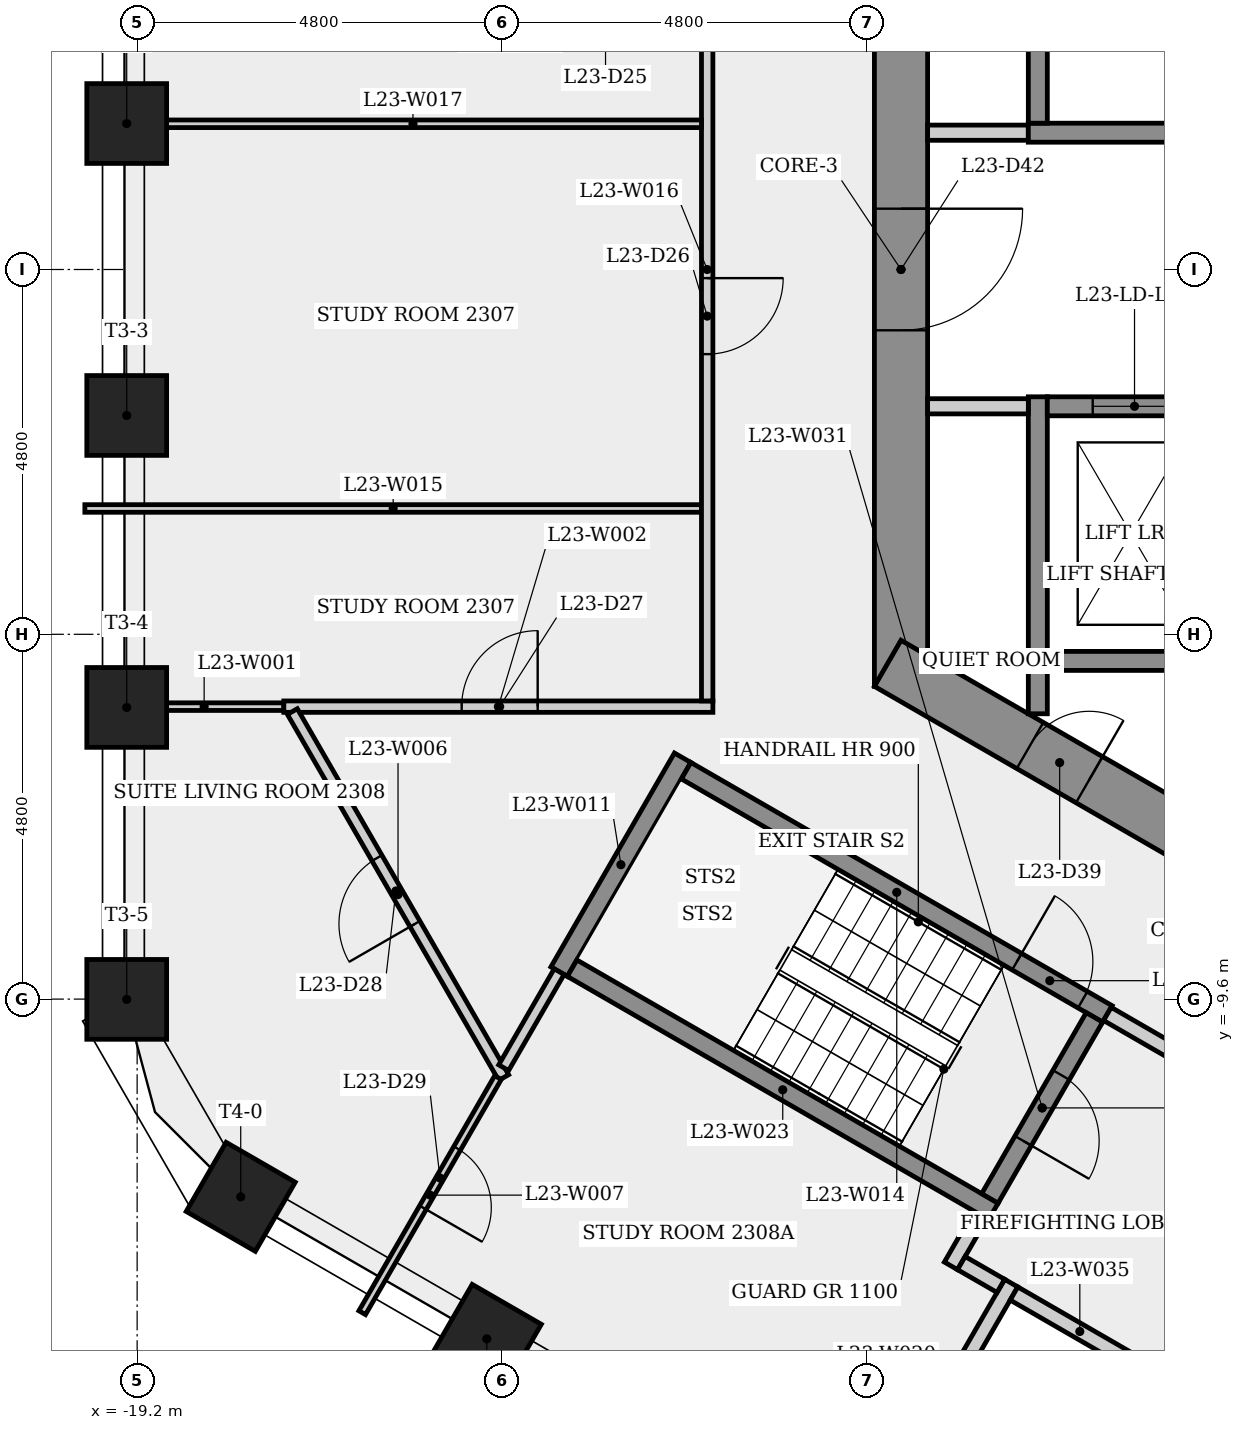
"""IFC4 building model, lengths in metres.
Left out: names, types, materials, properties, quantities, classifications, styles, units other than length and angle.
Written with IfcOpenShell. Run it as: python <this file> out.ifc"""

import sys

from ifc_helpers import new_model, si_unit, direction, frame, frame_2d, origin, origin_2d, place, context, subcontext, project, spatial, rectangle, extrude, element, fill, save


model = new_model("IFC4")
c1 = context("Model", 3, precision=1e-05, world=origin(), true_north=direction((0.0, 1.0)))
c2 = subcontext(c1, "Body", "Model", "MODEL_VIEW")
j1 = project(units=[si_unit("LENGTHUNIT", "METRE"), si_unit("PLANEANGLEUNIT", "RADIAN")], contexts=[c1])
p1 = place(None, origin())
s1 = spatial("IfcSite", under=j1, at=p1, CompositionType="ELEMENT")
p2 = place(p1, origin())
s2 = spatial("IfcBuilding", under=s1, at=p2, CompositionType="ELEMENT")
p3 = place(p2, frame((0.0, 0.0, 89.9)))
s3 = spatial("IfcBuildingStorey", under=s2, at=p3, CompositionType="ELEMENT", Elevation=89.9)
p4 = place(p3, frame((-9.15, 5.485, 0.0), z_axis=(0.0, 0.0, 1.0), x_axis=(0.0, -1.0, 0.0)))
e1 = element("IfcWall", 1, at=p4, inside=s3, PredefinedType="SHEAR", context=c2, shape_type="SweptSolid", body=[
    extrude(rectangle(XDim=10.97, YDim=0.7, at=frame_2d((5.485, 0.0))), origin(), (0.0, 0.0, 1.0), 3.4),
])
p5 = place(p4, frame((4.685, 0.0, 0.0)))
e2 = element("IfcOpeningElement", 2, at=p5, cuts=e1, PredefinedType="OPENING", context=c2, shape_type="SweptSolid", body=[
    extrude(rectangle(XDim=1.6, YDim=2.1, at=frame_2d((0.8, 1.05))), frame((0.0, 0.36, 0.0), z_axis=(0.0, -1.0, 0.0), x_axis=(1.0, 0.0, 0.0)), (0.0, 0.0, 1.0), 0.72),
])
p6 = place(p3, frame((-9.325, -5.182, 0.0), z_axis=(0.0, 0.0, 1.0), x_axis=(0.866023993627, -0.500002442456, 0.0)))
e3 = element("IfcWall", 3, at=p6, inside=s3, PredefinedType="SHEAR", context=c2, shape_type="SweptSolid", body=[
    extrude(rectangle(XDim=10.97, YDim=0.7, at=frame_2d((5.485, 0.0))), origin(), (0.0, 0.0, 1.0), 3.4),
])
p7 = place(p6, frame((2.163, 0.0, 0.0)))
e4 = element("IfcOpeningElement", 4, at=p7, cuts=e3, PredefinedType="OPENING", context=c2, shape_type="SweptSolid", body=[
    extrude(rectangle(XDim=0.9, YDim=2.1, at=frame_2d((0.45, 1.05))), frame((0.0, 0.36, 0.0), z_axis=(0.0, -1.0, 0.0), x_axis=(1.0, 0.0, 0.0)), (0.0, 0.0, 1.0), 0.72),
])
for number, where, z_axis, x_axis in (
    (5, (-19.337, 1.921, 0.0), (0.0, 0.0, 1.0), (-1.0, 0.0, 0.0)),
    (6, (-19.337, -1.921, 0.0), (0.0, 0.0, 1.0), (-1.0, 0.0, 0.0)),
    (7, (-19.337, -5.762, 0.0), (0.0, 0.0, 1.0), (-1.0, 0.0, 0.0)),
    (8, (-19.337, -9.604, 0.0), (0.0, 0.0, 1.0), (-1.0, 0.0, 0.0)),
    (9, (-17.837, -12.202, 0.0), (0.0, 0.0, 1.0), (-0.5, -0.866, 0.0)),
    (10, (-14.599, -14.071, 0.0), (0.0, 0.0, 1.0), (-0.5, -0.866, 0.0)),
):
    element("IfcColumn", number, at=place(p3, frame(where, z_axis=z_axis, x_axis=x_axis)), inside=s3, PredefinedType="COLUMN", context=c2, shape_type="SweptSolid", body=[
        extrude(rectangle(XDim=1.05, YDim=1.05, at=origin_2d()), origin(), (0.0, 0.0, 1.0), 3.4),
    ])
p8 = place(p3, frame((-17.27, -5.752, 0.0), z_axis=(0.0, 0.0, 1.0), x_axis=(-1.0, 0.0, 0.0)))
e11 = element("IfcWall", 11, at=p8, inside=s3, PredefinedType="PARTITIONING", context=c2, shape_type="SweptSolid", body=[
    extrude(rectangle(XDim=2.097, YDim=0.1, at=frame_2d((1.048, 0.0))), origin(), (0.0, 0.0, 1.0), 3.05),
])
p9 = place(p3, frame((-17.27, -5.752, 0.0), z_axis=(0.0, 0.0, 1.0), x_axis=(1.0, 0.0, 0.0)))
e12 = element("IfcWall", 12, at=p9, inside=s3, PredefinedType="PARTITIONING", context=c2, shape_type="SweptSolid", body=[
    extrude(rectangle(XDim=5.645, YDim=0.15, at=frame_2d((2.823, 0.0))), origin(), (0.0, 0.0, 1.0), 3.05),
])
p10 = place(p9, frame((2.34, 0.0, 0.0)))
e13 = element("IfcOpeningElement", 13, at=p10, cuts=e12, PredefinedType="OPENING", context=c2, shape_type="SweptSolid", body=[
    extrude(rectangle(XDim=1.0, YDim=2.1, at=frame_2d((0.5, 1.05))), frame((0.0, 0.085, 0.0), z_axis=(0.0, -1.0, 0.0), x_axis=(1.0, 0.0, 0.0)), (0.0, 0.0, 1.0), 0.17),
])
p11 = place(p3, frame((-14.377, -10.632, 0.0), z_axis=(0.0, 0.0, 1.0), x_axis=(-0.500011304563, 0.866018876994, 0.0)))
e14 = element("IfcWall", 14, at=p11, inside=s3, PredefinedType="PARTITIONING", context=c2, shape_type="SweptSolid", body=[
    extrude(rectangle(XDim=5.56, YDim=0.15, at=frame_2d((2.78, 0.0))), origin(), (0.0, 0.0, 1.0), 3.05),
])
p12 = place(p11, frame((2.335, 0.0, 0.0)))
e15 = element("IfcOpeningElement", 15, at=p12, cuts=e14, PredefinedType="OPENING", context=c2, shape_type="SweptSolid", body=[
    extrude(rectangle(XDim=1.0, YDim=2.1, at=frame_2d((0.5, 1.05))), frame((0.0, 0.085, 0.0), z_axis=(0.0, -1.0, 0.0), x_axis=(1.0, 0.0, 0.0)), (0.0, 0.0, 1.0), 0.17),
])
p13 = place(p3, frame((-14.452, -10.632, 0.0), z_axis=(0.0, 0.0, 1.0), x_axis=(-0.500012302351, -0.866018300902, 0.0)))
e16 = element("IfcWall", 16, at=p13, inside=s3, PredefinedType="PARTITIONING", context=c2, shape_type="SweptSolid", body=[
    extrude(rectangle(XDim=3.573, YDim=0.1, at=frame_2d((1.786, 0.0))), origin(), (0.0, 0.0, 1.0), 3.05),
])
p14 = place(p13, frame((1.076, 0.0, 0.0)))
e17 = element("IfcOpeningElement", 17, at=p14, cuts=e16, PredefinedType="OPENING", context=c2, shape_type="SweptSolid", body=[
    extrude(rectangle(XDim=0.9, YDim=2.1, at=frame_2d((0.45, 1.05))), frame((0.0, 0.06, 0.0), z_axis=(0.0, -1.0, 0.0), x_axis=(1.0, 0.0, 0.0)), (0.0, 0.0, 1.0), 0.12),
])
p15 = place(p3, frame((-13.648, -9.239, 0.0), z_axis=(0.0, 0.0, 1.0), x_axis=(0.500017246033, 0.866015446554, 0.0)))
e18 = element("IfcWall", 18, at=p15, inside=s3, PredefinedType="SHEAR", context=c2, shape_type="SweptSolid", body=[
    extrude(rectangle(XDim=3.25, YDim=0.25, at=frame_2d((1.625, 0.0))), origin(), (0.0, 0.0, 1.0), 3.05),
])
p16 = place(p3, frame((-13.648, -9.239, 0.0), z_axis=(0.0, 0.0, 1.0), x_axis=(-0.500079678529, -0.865979396477, 0.0)))
e19 = element("IfcWall", 19, at=p16, inside=s3, PredefinedType="PARTITIONING", context=c2, shape_type="SweptSolid", body=[
    extrude(rectangle(XDim=1.459, YDim=0.15, at=frame_2d((0.729, 0.0))), origin(), (0.0, 0.0, 1.0), 3.05),
])
p17 = place(p3, frame((-11.977, -6.595, 0.0), z_axis=(0.0, 0.0, 1.0), x_axis=(0.866025499775, -0.499999833739, 0.0)))
e20 = element("IfcWall", 20, at=p17, inside=s3, PredefinedType="SHEAR", context=c2, shape_type="SweptSolid", body=[
    extrude(rectangle(XDim=6.4, YDim=0.25, at=frame_2d((3.2, 0.0))), origin(), (0.0, 0.0, 1.0), 3.05),
])
p18 = place(p17, frame((5.025, 0.0, 0.0)))
e21 = element("IfcOpeningElement", 21, at=p18, cuts=e20, PredefinedType="OPENING", context=c2, shape_type="SweptSolid", body=[
    extrude(rectangle(XDim=1.0, YDim=2.1, at=frame_2d((0.5, 1.05))), frame((0.0, 0.135, 0.0), z_axis=(0.0, -1.0, 0.0), x_axis=(1.0, 0.0, 0.0)), (0.0, 0.0, 1.0), 0.27),
])
p19 = place(p3, frame((-11.775, -3.144, 0.0), z_axis=(0.0, 0.0, 1.0), x_axis=(-1.0, 0.0, 0.0)))
e22 = element("IfcWall", 22, at=p19, inside=s3, PredefinedType="PARTITIONING", context=c2, shape_type="SweptSolid", body=[
    extrude(rectangle(XDim=8.113, YDim=0.1, at=frame_2d((4.057, 0.0))), origin(), (0.0, 0.0, 1.0), 3.05),
])
p20 = place(p3, frame((-11.7, 5.677, 0.0), z_axis=(0.0, 0.0, 1.0), x_axis=(0.0, -1.0, 0.0)))
e23 = element("IfcWall", 23, at=p20, inside=s3, PredefinedType="PARTITIONING", context=c2, shape_type="SweptSolid", body=[
    extrude(rectangle(XDim=11.354, YDim=0.15, at=frame_2d((5.677, 0.0))), origin(), (0.0, 0.0, 1.0), 3.05),
])
p21 = place(p20, frame((5.79, 0.0, 0.0)))
e24 = element("IfcOpeningElement", 24, at=p21, cuts=e23, PredefinedType="OPENING", context=c2, shape_type="SweptSolid", body=[
    extrude(rectangle(XDim=1.0, YDim=2.1, at=frame_2d((0.5, 1.05))), frame((0.0, 0.085, 0.0), z_axis=(0.0, -1.0, 0.0), x_axis=(1.0, 0.0, 0.0)), (0.0, 0.0, 1.0), 0.17),
])
p22 = place(p3, frame((-11.775, 1.917, 0.0), z_axis=(0.0, 0.0, 1.0), x_axis=(-1.0, 0.0, 0.0)))
e25 = element("IfcWall", 25, at=p22, inside=s3, PredefinedType="PARTITIONING", context=c2, shape_type="SweptSolid", body=[
    extrude(rectangle(XDim=7.592, YDim=0.1, at=frame_2d((3.796, 0.0))), origin(), (0.0, 0.0, 1.0), 3.05),
])
p23 = place(p3, frame((-8.8, 1.8, 0.0), z_axis=(0.0, 0.0, 1.0), x_axis=(1.0, 0.0, 0.0)))
e26 = element("IfcWall", 26, at=p23, inside=s3, PredefinedType="PARTITIONING", context=c2, shape_type="SweptSolid", body=[
    extrude(rectangle(XDim=1.325, YDim=0.2, at=frame_2d((0.663, 0.0))), origin(), (0.0, 0.0, 1.0), 3.05),
])
p24 = place(p3, frame((-8.79, -15.225, 0.0), z_axis=(0.0, 0.0, 1.0), x_axis=(0.500016430238, 0.866015917575, 0.0)))
e27 = element("IfcWall", 27, at=p24, inside=s3, PredefinedType="PLUMBINGWALL", context=c2, shape_type="SweptSolid", body=[
    extrude(rectangle(XDim=2.181, YDim=0.2, at=frame_2d((1.09, 0.0))), origin(), (0.0, 0.0, 1.0), 3.05),
])
p25 = place(p3, frame((-8.493, -13.11, 0.0), z_axis=(0.0, 0.0, 1.0), x_axis=(0.500067724834, 0.865986299303, 0.0)))
e28 = element("IfcWall", 28, at=p25, inside=s3, PredefinedType="PARTITIONING", context=c2, shape_type="SweptSolid", body=[
    extrude(rectangle(XDim=0.775, YDim=0.2, at=frame_2d((0.388, 0.0))), origin(), (0.0, 0.0, 1.0), 3.05),
])
p26 = place(p3, frame((-7.935, -12.393, 0.0), z_axis=(0.0, 0.0, 1.0), x_axis=(-0.866025499775, 0.499999833739, 0.0)))
e29 = element("IfcWall", 29, at=p26, inside=s3, PredefinedType="SHEAR", context=c2, shape_type="SweptSolid", body=[
    extrude(rectangle(XDim=6.4, YDim=0.25, at=frame_2d((3.2, 0.0))), origin(), (0.0, 0.0, 1.0), 3.05),
])
p27 = place(p3, frame((-7.836, -13.373, 0.0), z_axis=(0.0, 0.0, 1.0), x_axis=(-0.866232998003, 0.499640263761, 0.0)))
e30 = element("IfcWall", 30, at=p27, inside=s3, PredefinedType="PARTITIONING", context=c2, shape_type="SweptSolid", body=[
    extrude(rectangle(XDim=0.6, YDim=0.2, at=frame_2d((0.3, 0.0))), origin(), (0.0, 0.0, 1.0), 3.05),
])
p28 = place(p3, frame((-7.475, 1.8, 0.0), z_axis=(0.0, 0.0, 1.0), x_axis=(1.0, 0.0, 0.0)))
e31 = element("IfcWall", 31, at=p28, inside=s3, PredefinedType="SHEAR", context=c2, shape_type="SweptSolid", body=[
    extrude(rectangle(XDim=14.95, YDim=0.25, at=frame_2d((7.475, 0.0))), origin(), (0.0, 0.0, 1.0), 3.05),
])
p29 = place(p3, frame((-7.35, -5.846, 0.0), z_axis=(0.0, 0.0, 1.0), x_axis=(0.0, 1.0, 0.0)))
e32 = element("IfcWall", 32, at=p29, inside=s3, PredefinedType="SHEAR", context=c2, shape_type="SweptSolid", body=[
    extrude(rectangle(XDim=4.171, YDim=0.25, at=frame_2d((2.085, 0.0))), origin(), (0.0, 0.0, 1.0), 3.05),
])
p30 = place(p3, frame((-7.35, 1.925, 0.0), z_axis=(0.0, 0.0, 1.0), x_axis=(0.0, 1.0, 0.0)))
e33 = element("IfcWall", 33, at=p30, inside=s3, PredefinedType="SHEAR", context=c2, shape_type="SweptSolid", body=[
    extrude(rectangle(XDim=3.921, YDim=0.25, at=frame_2d((1.96, 0.0))), origin(), (0.0, 0.0, 1.0), 3.05),
])
p31 = place(p3, frame((-7.475, -1.8, 0.0), z_axis=(0.0, 0.0, 1.0), x_axis=(-1.0, 0.0, 0.0)))
e34 = element("IfcWall", 34, at=p31, inside=s3, PredefinedType="PARTITIONING", context=c2, shape_type="SweptSolid", body=[
    extrude(rectangle(XDim=1.325, YDim=0.2, at=frame_2d((0.663, 0.0))), origin(), (0.0, 0.0, 1.0), 3.05),
])
p32 = place(p3, frame((-6.605, -9.841, 0.0), z_axis=(0.0, 0.0, 1.0), x_axis=(-0.499996545922, -0.866027397988, 0.0)))
e35 = element("IfcWall", 35, at=p32, inside=s3, PredefinedType="SHEAR", context=c2, shape_type="SweptSolid", body=[
    extrude(rectangle(XDim=2.75, YDim=0.25, at=frame_2d((1.375, 0.0))), origin(), (0.0, 0.0, 1.0), 3.05),
])
p33 = place(p32, frame((0.875, 0.0, 0.0)))
e36 = element("IfcOpeningElement", 36, at=p33, cuts=e35, PredefinedType="OPENING", context=c2, shape_type="SweptSolid", body=[
    extrude(rectangle(XDim=1.0, YDim=2.1, at=frame_2d((0.5, 1.05))), frame((0.0, 0.135, 0.0), z_axis=(0.0, -1.0, 0.0), x_axis=(1.0, 0.0, 0.0)), (0.0, 0.0, 1.0), 0.27),
])
p34 = place(p3, frame((-6.435, -9.795, 0.0), z_axis=(0.0, 0.0, 1.0), x_axis=(0.866012907634, -0.500021643343, 0.0)))
e37 = element("IfcWall", 37, at=p34, inside=s3, PredefinedType="PARTITIONING", context=c2, shape_type="SweptSolid", body=[
    extrude(rectangle(XDim=4.45, YDim=0.2, at=frame_2d((2.225, 0.0))), origin(), (0.0, 0.0, 1.0), 3.05),
])
p35 = place(p34, frame((1.675, 0.0, 0.0)))
e38 = element("IfcOpeningElement", 38, at=p35, cuts=e37, PredefinedType="OPENING", context=c2, shape_type="SweptSolid", body=[
    extrude(rectangle(XDim=1.1, YDim=2.1, at=frame_2d((0.55, 1.05))), frame((0.0, 0.11, 0.0), z_axis=(0.0, -1.0, 0.0), x_axis=(1.0, 0.0, 0.0)), (0.0, 0.0, 1.0), 0.22),
])
p36 = place(p3, frame((-5.931, -14.473, 0.0), z_axis=(0.0, 0.0, 1.0), x_axis=(-0.866041268327, 0.499972520799, 0.0)))
e39 = element("IfcWall", 39, at=p36, inside=s3, PredefinedType="PLUMBINGWALL", context=c2, shape_type="SweptSolid", body=[
    extrude(rectangle(XDim=2.0, YDim=0.2, at=frame_2d((1.0, 0.0))), origin(), (0.0, 0.0, 1.0), 3.05),
])
p37 = place(p3, frame((-7.225, -5.15, 0.0), z_axis=(0.0, 0.0, 1.0), x_axis=(1.0, 0.0, 0.0)))
e40 = element("IfcWall", 40, at=p37, inside=s3, PredefinedType="SHEAR", context=c2, shape_type="SweptSolid", body=[
    extrude(rectangle(XDim=14.7, YDim=0.25, at=frame_2d((7.35, 0.0))), origin(), (0.0, 0.0, 1.0), 3.05),
])
p38 = place(p3, frame((-7.225, -1.8, 0.0), z_axis=(0.0, 0.0, 1.0), x_axis=(1.0, 0.0, 0.0)))
e41 = element("IfcWall", 41, at=p38, inside=s3, PredefinedType="SHEAR", context=c2, shape_type="SweptSolid", body=[
    extrude(rectangle(XDim=14.7, YDim=0.25, at=frame_2d((7.35, 0.0))), origin(), (0.0, 0.0, 1.0), 3.05),
])
p39 = place(p38, frame((0.597, 0.0, 0.0)))
e42 = element("IfcOpeningElement", 42, at=p39, cuts=e41, PredefinedType="OPENING", context=c2, shape_type="SweptSolid", body=[
    extrude(rectangle(XDim=1.1, YDim=2.1, at=frame_2d((0.55, 1.05))), frame((0.0, 0.135, 0.0), z_axis=(0.0, -1.0, 0.0), x_axis=(1.0, 0.0, 0.0)), (0.0, 0.0, 1.0), 0.27),
])
p40 = place(p38, frame((3.0, 0.0, 0.0)))
e43 = element("IfcOpeningElement", 43, at=p40, cuts=e41, PredefinedType="OPENING", context=c2, shape_type="SweptSolid", body=[
    extrude(rectangle(XDim=1.1, YDim=2.1, at=frame_2d((0.55, 1.05))), frame((0.0, 0.135, 0.0), z_axis=(0.0, -1.0, 0.0), x_axis=(1.0, 0.0, 0.0)), (0.0, 0.0, 1.0), 0.27),
])
p41 = place(p38, frame((5.45, 0.0, 0.0)))
e44 = element("IfcOpeningElement", 44, at=p41, cuts=e41, PredefinedType="OPENING", context=c2, shape_type="SweptSolid", body=[
    extrude(rectangle(XDim=1.1, YDim=2.1, at=frame_2d((0.55, 1.05))), frame((0.0, 0.135, 0.0), z_axis=(0.0, -1.0, 0.0), x_axis=(1.0, 0.0, 0.0)), (0.0, 0.0, 1.0), 0.27),
])
p42 = place(p38, frame((7.9, 0.0, 0.0)))
e45 = element("IfcOpeningElement", 45, at=p42, cuts=e41, PredefinedType="OPENING", context=c2, shape_type="SweptSolid", body=[
    extrude(rectangle(XDim=1.1, YDim=2.1, at=frame_2d((0.55, 1.05))), frame((0.0, 0.135, 0.0), z_axis=(0.0, -1.0, 0.0), x_axis=(1.0, 0.0, 0.0)), (0.0, 0.0, 1.0), 0.27),
])
p43 = place(p38, frame((10.35, 0.0, 0.0)))
e46 = element("IfcOpeningElement", 46, at=p43, cuts=e41, PredefinedType="OPENING", context=c2, shape_type="SweptSolid", body=[
    extrude(rectangle(XDim=1.1, YDim=2.1, at=frame_2d((0.55, 1.05))), frame((0.0, 0.135, 0.0), z_axis=(0.0, -1.0, 0.0), x_axis=(1.0, 0.0, 0.0)), (0.0, 0.0, 1.0), 0.27),
])
p44 = place(p39, origin())
e47 = element("IfcDoor", 47, at=p44, inside=s3, OperationType="SLIDING_TO_LEFT", PredefinedType="DOOR", context=c2, shape_type="SweptSolid", body=[
    extrude(rectangle(XDim=1.1, YDim=2.1, at=frame_2d((0.55, 1.05))), frame((0.0, 0.025, 0.0), z_axis=(0.0, -1.0, 0.0), x_axis=(1.0, 0.0, 0.0)), (0.0, 0.0, 1.0), 0.05),
])
fill(e42, e47)
p45 = place(p18, origin())
e48 = element("IfcDoor", 48, at=p45, inside=s3, OperationType="SINGLE_SWING_LEFT", PredefinedType="DOOR", context=c2, shape_type="SweptSolid", body=[
    extrude(rectangle(XDim=1.0, YDim=2.1, at=frame_2d((0.5, 1.05))), frame((0.0, 0.025, 0.0), z_axis=(0.0, -1.0, 0.0), x_axis=(1.0, 0.0, 0.0)), (0.0, 0.0, 1.0), 0.05),
])
fill(e21, e48)
p46 = place(p33, origin())
e49 = element("IfcDoor", 49, at=p46, inside=s3, OperationType="SINGLE_SWING_RIGHT", PredefinedType="DOOR", context=c2, shape_type="SweptSolid", body=[
    extrude(rectangle(XDim=1.0, YDim=2.1, at=frame_2d((0.5, 1.05))), frame((0.0, 0.025, 0.0), z_axis=(0.0, -1.0, 0.0), x_axis=(1.0, 0.0, 0.0)), (0.0, 0.0, 1.0), 0.05),
])
fill(e36, e49)
p47 = place(p21, origin())
e50 = element("IfcDoor", 50, at=p47, inside=s3, OperationType="SINGLE_SWING_LEFT", PredefinedType="DOOR", context=c2, shape_type="SweptSolid", body=[
    extrude(rectangle(XDim=1.0, YDim=2.1, at=frame_2d((0.5, 1.05))), frame((0.0, 0.025, 0.0), z_axis=(0.0, -1.0, 0.0), x_axis=(1.0, 0.0, 0.0)), (0.0, 0.0, 1.0), 0.05),
])
fill(e24, e50)
p48 = place(p10, origin())
e51 = element("IfcDoor", 51, at=p48, inside=s3, OperationType="SINGLE_SWING_RIGHT", PredefinedType="DOOR", context=c2, shape_type="SweptSolid", body=[
    extrude(rectangle(XDim=1.0, YDim=2.1, at=frame_2d((0.5, 1.05))), frame((0.0, 0.025, 0.0), z_axis=(0.0, -1.0, 0.0), x_axis=(1.0, 0.0, 0.0)), (0.0, 0.0, 1.0), 0.05),
])
fill(e13, e51)
p49 = place(p12, origin())
e52 = element("IfcDoor", 52, at=p49, inside=s3, OperationType="SINGLE_SWING_LEFT", PredefinedType="DOOR", context=c2, shape_type="SweptSolid", body=[
    extrude(rectangle(XDim=1.0, YDim=2.1, at=frame_2d((0.5, 1.05))), frame((0.0, 0.025, 0.0), z_axis=(0.0, -1.0, 0.0), x_axis=(1.0, 0.0, 0.0)), (0.0, 0.0, 1.0), 0.05),
])
fill(e15, e52)
p50 = place(p14, origin())
e53 = element("IfcDoor", 53, at=p50, inside=s3, OperationType="SINGLE_SWING_RIGHT", PredefinedType="DOOR", context=c2, shape_type="SweptSolid", body=[
    extrude(rectangle(XDim=0.9, YDim=2.1, at=frame_2d((0.45, 1.05))), frame((0.0, 0.025, 0.0), z_axis=(0.0, -1.0, 0.0), x_axis=(1.0, 0.0, 0.0)), (0.0, 0.0, 1.0), 0.05),
])
fill(e17, e53)
p51 = place(p7, origin())
e54 = element("IfcDoor", 54, at=p51, inside=s3, OperationType="SINGLE_SWING_RIGHT", PredefinedType="DOOR", context=c2, shape_type="SweptSolid", body=[
    extrude(rectangle(XDim=0.9, YDim=2.1, at=frame_2d((0.45, 1.05))), frame((0.0, 0.025, 0.0), z_axis=(0.0, -1.0, 0.0), x_axis=(1.0, 0.0, 0.0)), (0.0, 0.0, 1.0), 0.05),
])
fill(e4, e54)
p52 = place(p5, origin())
e55 = element("IfcDoor", 55, at=p52, inside=s3, OperationType="SINGLE_SWING_LEFT", PredefinedType="DOOR", context=c2, shape_type="SweptSolid", body=[
    extrude(rectangle(XDim=1.6, YDim=2.1, at=frame_2d((0.8, 1.05))), frame((0.0, 0.025, 0.0), z_axis=(0.0, -1.0, 0.0), x_axis=(1.0, 0.0, 0.0)), (0.0, 0.0, 1.0), 0.05),
])
fill(e2, e55)
save(model, sys.argv[1])
